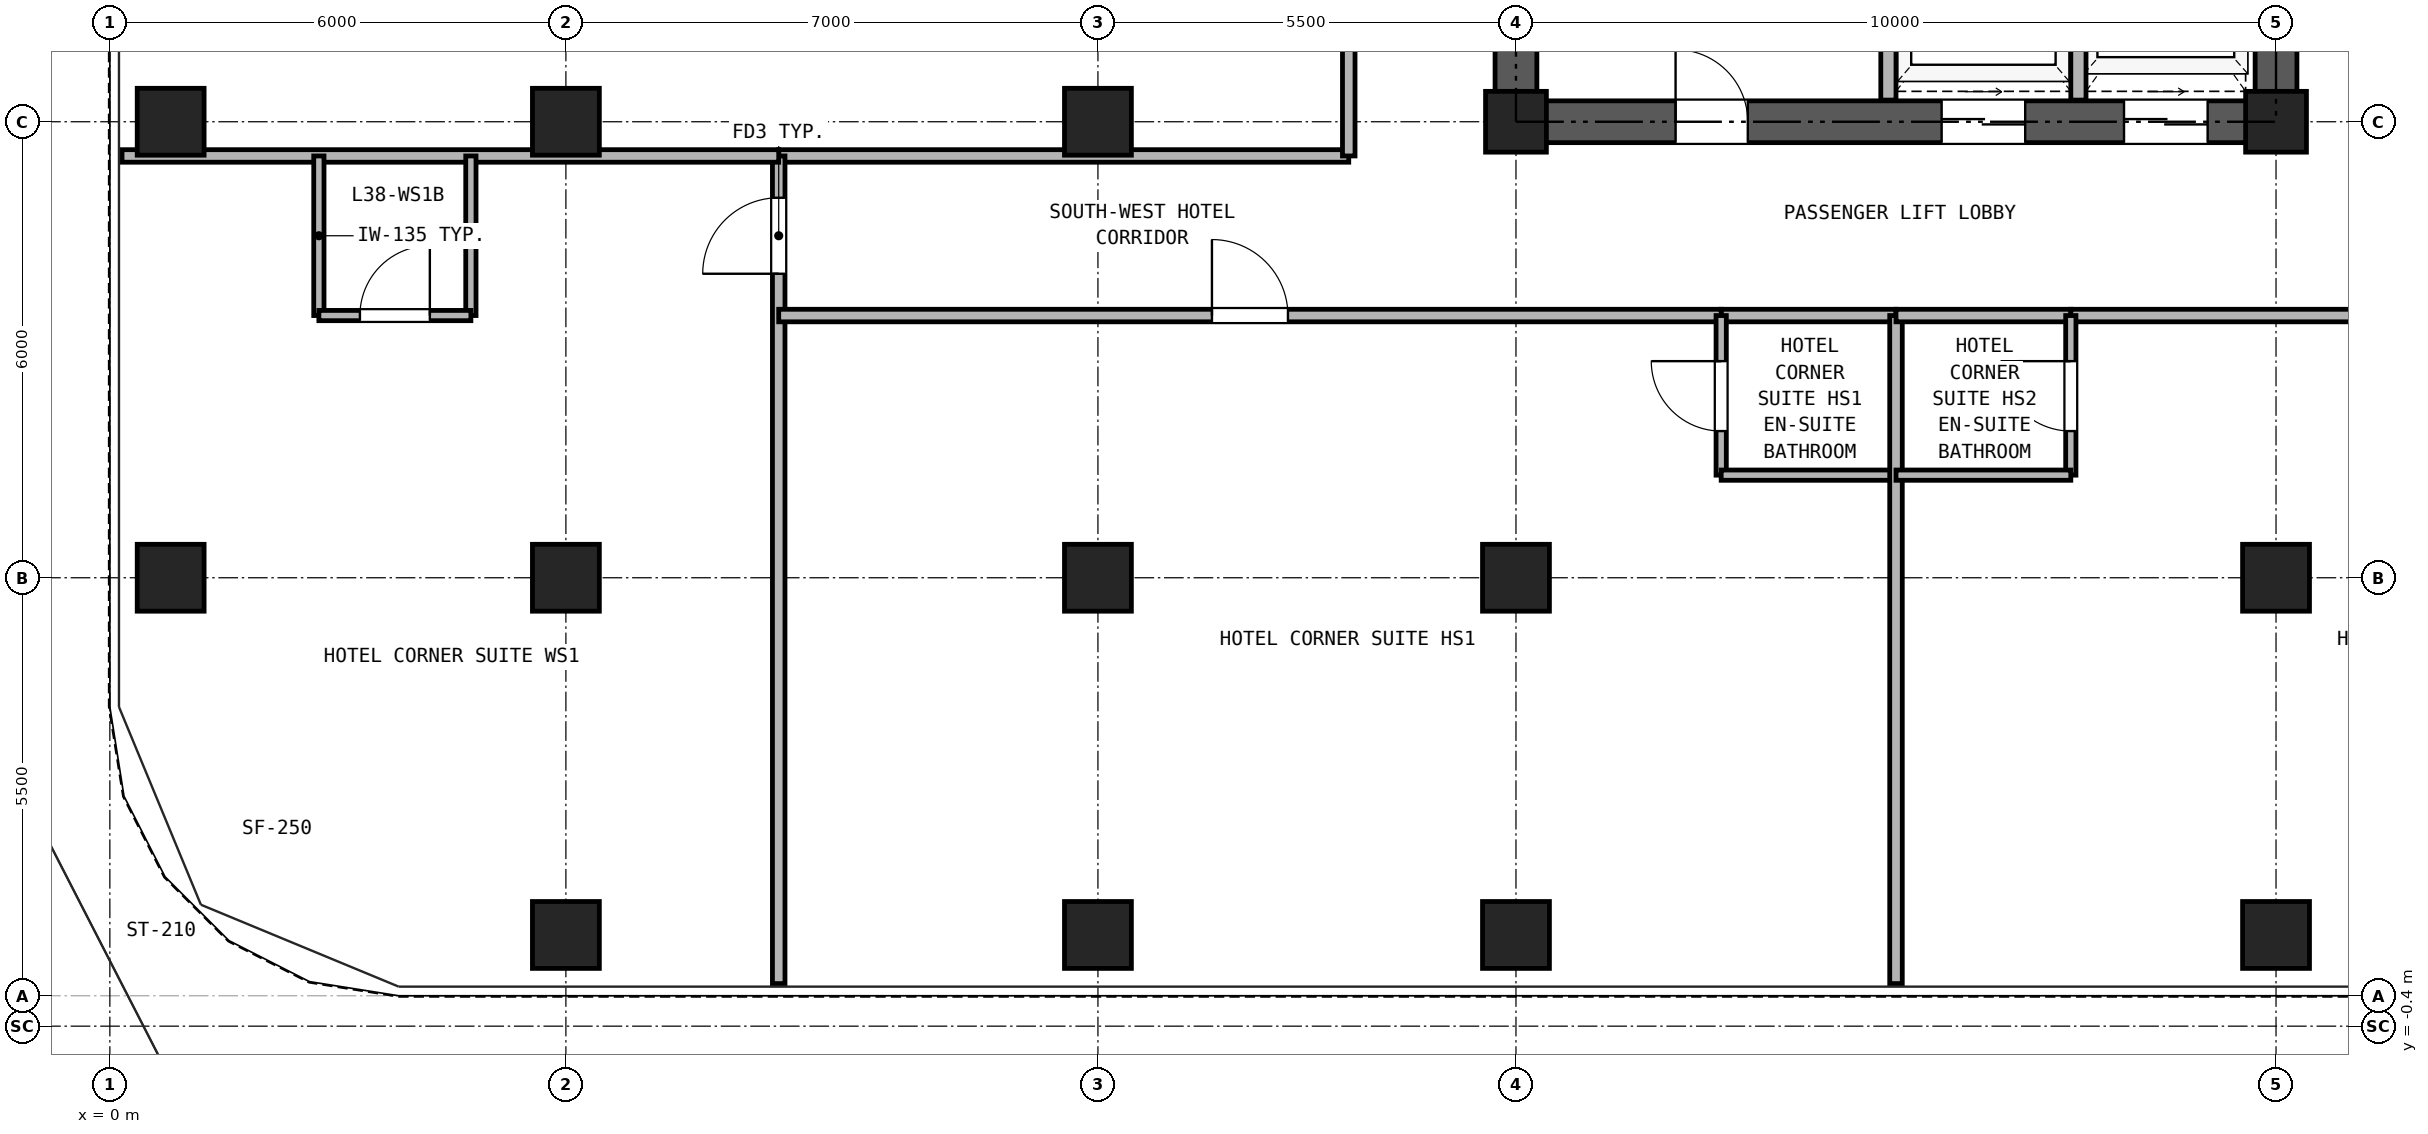
"""IFC4 building model, lengths in metres.
Left out: names, types, materials, properties, quantities, classifications, styles, units other than length and angle.
Written with IfcOpenShell. Run it as: python <this file> out.ifc"""

import sys

from ifc_helpers import new_model, si_unit, direction, frame, frame_2d, origin, origin_2d, place, context, subcontext, project, spatial, rectangle, hollow_rectangle, extrude, source, transform, mapped, element, fill, save


model = new_model("IFC4")
c1 = context("Model", 3, precision=1e-05, world=origin(), true_north=direction((0.0, 1.0)))
c2 = subcontext(c1, "Body", "Model", "MODEL_VIEW")
j1 = project(units=[si_unit("LENGTHUNIT", "METRE"), si_unit("PLANEANGLEUNIT", "RADIAN")], contexts=[c1])
p1 = place(None, origin())
s1 = spatial("IfcSite", under=j1, at=p1, CompositionType="ELEMENT")
p2 = place(p1, origin())
s2 = spatial("IfcBuilding", under=s1, at=p2, CompositionType="ELEMENT")
p3 = place(p2, frame((0.0, 0.0, 137.5)))
s3 = spatial("IfcBuildingStorey", under=s2, at=p3, CompositionType="ELEMENT", Elevation=137.5)
m1 = source(origin(), c2, "Body", "SweptSolid", [
    extrude(hollow_rectangle(XDim=0.88, YDim=0.88, WallThickness=0.05, at=origin_2d()), origin(), (0.0, 0.0, 1.0), 2.95),
])
for number, where, z_axis, x_axis in (
    (1, (6.0, 0.8, 0.0), (0.0, 0.0, 1.0), (1.0, 0.0, 0.0)),
    (2, (13.0, 0.8, 0.0), (0.0, 0.0, 1.0), (1.0, 0.0, 0.0)),
    (3, (18.5, 0.8, 0.0), (0.0, 0.0, 1.0), (1.0, 0.0, 0.0)),
    (4, (28.5, 0.8, 0.0), (0.0, 0.0, 1.0), (1.0, 0.0, 0.0)),
    (5, (0.8, 5.5, 0.0), (0.0, 0.0, 1.0), (1.0, 0.0, 0.0)),
    (6, (0.8, 11.5, 0.0), (0.0, 0.0, 1.0), (1.0, 0.0, 0.0)),
    (7, (6.0, 5.5, 0.0), (0.0, 0.0, 1.0), (1.0, 0.0, 0.0)),
    (8, (6.0, 11.5, 0.0), (0.0, 0.0, 1.0), (1.0, 0.0, 0.0)),
    (9, (13.0, 5.5, 0.0), (0.0, 0.0, 1.0), (1.0, 0.0, 0.0)),
    (10, (13.0, 11.5, 0.0), (0.0, 0.0, 1.0), (1.0, 0.0, 0.0)),
    (11, (18.5, 5.5, 0.0), (0.0, 0.0, 1.0), (1.0, 0.0, 0.0)),
):
    element("IfcColumn", number, at=place(p3, frame(where, z_axis=z_axis, x_axis=x_axis)), inside=s3, PredefinedType="COLUMN", context=c2, shape_type="MappedRepresentation", body=[
        mapped(m1, transform((0.0, 0.0, 0.0), x_axis=(1.0, 0.0, 0.0), y_axis=(0.0, 1.0, 0.0), z_axis=(0.0, 0.0, 1.0), scale=1.0)),
    ])
m2 = source(origin(), c2, "Body", "SweptSolid", [
    extrude(hollow_rectangle(XDim=0.8, YDim=0.8, WallThickness=0.045, at=origin_2d()), origin(), (0.0, 0.0, 1.0), 2.95),
])
p4 = place(p3, frame((18.5, 11.5, 0.0), z_axis=(0.0, 0.0, 1.0), x_axis=(1.0, 0.0, 0.0)))
e12 = element("IfcColumn", 12, at=p4, inside=s3, PredefinedType="COLUMN", context=c2, shape_type="MappedRepresentation", body=[
    mapped(m2, transform((0.0, 0.0, 0.0), x_axis=(1.0, 0.0, 0.0), y_axis=(0.0, 1.0, 0.0), z_axis=(0.0, 0.0, 1.0), scale=1.0)),
])
p5 = place(p3, frame((28.5, 5.5, 0.0), z_axis=(0.0, 0.0, 1.0), x_axis=(1.0, 0.0, 0.0)))
e13 = element("IfcColumn", 13, at=p5, inside=s3, PredefinedType="COLUMN", context=c2, shape_type="MappedRepresentation", body=[
    mapped(m1, transform((0.0, 0.0, 0.0), x_axis=(1.0, 0.0, 0.0), y_axis=(0.0, 1.0, 0.0), z_axis=(0.0, 0.0, 1.0), scale=1.0)),
])
p6 = place(p3, frame((28.5, 11.5, 0.0), z_axis=(0.0, 0.0, 1.0), x_axis=(1.0, 0.0, 0.0)))
e14 = element("IfcColumn", 14, at=p6, inside=s3, PredefinedType="COLUMN", context=c2, shape_type="MappedRepresentation", body=[
    mapped(m2, transform((0.0, 0.0, 0.0), x_axis=(1.0, 0.0, 0.0), y_axis=(0.0, 1.0, 0.0), z_axis=(0.0, 0.0, 1.0), scale=1.0)),
])
p7 = place(p3, frame((18.225, 11.5, 0.0), z_axis=(0.0, 0.0, 1.0), x_axis=(1.0, 0.0, 0.0)))
e15 = element("IfcWall", 15, at=p7, inside=s3, PredefinedType="SHEAR", context=c2, shape_type="SweptSolid", body=[
    extrude(rectangle(XDim=10.55, YDim=0.55, at=frame_2d((5.275, 0.0))), origin(), (0.0, 0.0, 1.0), 2.95),
])
p8 = place(p7, frame((2.375, 0.0, 0.0)))
e16 = element("IfcOpeningElement", 16, at=p8, cuts=e15, PredefinedType="OPENING", context=c2, shape_type="SweptSolid", body=[
    extrude(rectangle(XDim=0.95, YDim=2.15, at=frame_2d((0.475, 1.075))), frame((0.0, 0.285, 0.0), z_axis=(0.0, -1.0, 0.0), x_axis=(1.0, 0.0, 0.0)), (0.0, 0.0, 1.0), 0.57),
])
p9 = place(p7, frame((5.875, 0.0, 0.0)))
e17 = element("IfcOpeningElement", 17, at=p9, cuts=e15, PredefinedType="OPENING", context=c2, shape_type="SweptSolid", body=[
    extrude(rectangle(XDim=1.1, YDim=2.25, at=frame_2d((0.55, 1.125))), frame((0.0, 0.285, 0.0), z_axis=(0.0, -1.0, 0.0), x_axis=(1.0, 0.0, 0.0)), (0.0, 0.0, 1.0), 0.57),
])
p10 = place(p7, frame((8.275, 0.0, 0.0)))
e18 = element("IfcOpeningElement", 18, at=p10, cuts=e15, PredefinedType="OPENING", context=c2, shape_type="SweptSolid", body=[
    extrude(rectangle(XDim=1.1, YDim=2.25, at=frame_2d((0.55, 1.125))), frame((0.0, 0.285, 0.0), z_axis=(0.0, -1.0, 0.0), x_axis=(1.0, 0.0, 0.0)), (0.0, 0.0, 1.0), 0.57),
])
p11 = place(p3, frame((18.5, 11.775, 0.0), z_axis=(0.0, 0.0, 1.0), x_axis=(0.0, 1.0, 0.0)))
e19 = element("IfcWall", 19, at=p11, inside=s3, PredefinedType="SHEAR", context=c2, shape_type="SweptSolid", body=[
    extrude(rectangle(XDim=16.7, YDim=0.55, at=frame_2d((8.35, 0.0))), origin(), (0.0, 0.0, 1.0), 2.95),
])
p12 = place(p11, frame((7.375, 0.0, 0.0)))
e20 = element("IfcOpeningElement", 20, at=p12, cuts=e19, PredefinedType="OPENING", context=c2, shape_type="SweptSolid", body=[
    extrude(rectangle(XDim=1.15, YDim=2.2, at=frame_2d((0.575, 1.1))), frame((0.0, 0.285, 0.0), z_axis=(0.0, -1.0, 0.0), x_axis=(1.0, 0.0, 0.0)), (0.0, 0.0, 1.0), 0.57),
])
p13 = place(p3, frame((28.5, 11.775, 0.0), z_axis=(0.0, 0.0, 1.0), x_axis=(0.0, 1.0, 0.0)))
e21 = element("IfcWall", 21, at=p13, inside=s3, PredefinedType="SHEAR", context=c2, shape_type="SweptSolid", body=[
    extrude(rectangle(XDim=16.7, YDim=0.55, at=frame_2d((8.35, 0.0))), origin(), (0.0, 0.0, 1.0), 2.95),
])
p14 = place(p13, frame((7.375, 0.0, 0.0)))
e22 = element("IfcOpeningElement", 22, at=p14, cuts=e21, PredefinedType="OPENING", context=c2, shape_type="SweptSolid", body=[
    extrude(rectangle(XDim=1.15, YDim=2.2, at=frame_2d((0.575, 1.1))), frame((0.0, 0.285, 0.0), z_axis=(0.0, -1.0, 0.0), x_axis=(1.0, 0.0, 0.0)), (0.0, 0.0, 1.0), 0.57),
])
for number, where, z_axis, x_axis in (
    (23, (23.4, 11.785, 0.0), (0.0, 0.0, 1.0), (0.0, 1.0, 0.0)),
    (24, (25.9, 11.785, 0.0), (0.0, 0.0, 1.0), (0.0, 1.0, 0.0)),
):
    element("IfcWall", number, at=place(p3, frame(where, z_axis=z_axis, x_axis=x_axis)), inside=s3, PredefinedType="PARTITIONING", context=c2, shape_type="SweptSolid", body=[
        extrude(rectangle(XDim=3.215, YDim=0.2, at=frame_2d((1.607, 0.0))), origin(), (0.0, 0.0, 1.0), 2.95),
    ])
p15 = place(p3, frame((8.8, 11.05, 0.0), z_axis=(0.0, 0.0, 1.0), x_axis=(1.0, 0.0, 0.0)))
e25 = element("IfcWall", 25, at=p15, inside=s3, PredefinedType="PARTITIONING", context=c2, shape_type="SweptSolid", body=[
    extrude(rectangle(XDim=7.5, YDim=0.165, at=frame_2d((3.75, 0.0))), origin(), (0.0, 0.0, 1.0), 2.95),
])
p16 = place(p3, frame((16.3, 11.05, 0.0), z_axis=(0.0, 0.0, 1.0), x_axis=(0.0, 1.0, 0.0)))
e26 = element("IfcWall", 26, at=p16, inside=s3, PredefinedType="PARTITIONING", context=c2, shape_type="SweptSolid", body=[
    extrude(rectangle(XDim=18.2, YDim=0.165, at=frame_2d((9.1, 0.0))), origin(), (0.0, 0.0, 1.0), 2.95),
])
p17 = place(p16, frame((8.6, 0.0, 0.0)))
e27 = element("IfcOpeningElement", 27, at=p17, cuts=e26, PredefinedType="OPENING", context=c2, shape_type="SweptSolid", body=[
    extrude(rectangle(XDim=0.95, YDim=2.15, at=frame_2d((0.475, 1.075))), frame((0.0, 0.093, 0.0), z_axis=(0.0, -1.0, 0.0), x_axis=(1.0, 0.0, 0.0)), (0.0, 0.0, 1.0), 0.185),
])
p18 = place(p3, frame((8.8, 0.16, 0.0), z_axis=(0.0, 0.0, 1.0), x_axis=(0.0, 1.0, 0.0)))
e28 = element("IfcWall", 28, at=p18, inside=s3, PredefinedType="PARTITIONING", context=c2, shape_type="SweptSolid", body=[
    extrude(rectangle(XDim=10.89, YDim=0.165, at=frame_2d((5.445, 0.0))), origin(), (0.0, 0.0, 1.0), 2.95),
])
p19 = place(p18, frame((9.34, 0.0, 0.0)))
e29 = element("IfcOpeningElement", 29, at=p19, cuts=e28, PredefinedType="OPENING", context=c2, shape_type="SweptSolid", body=[
    extrude(rectangle(XDim=1.0, YDim=2.15, at=frame_2d((0.5, 1.075))), frame((0.0, 0.093, 0.0), z_axis=(0.0, -1.0, 0.0), x_axis=(1.0, 0.0, 0.0)), (0.0, 0.0, 1.0), 0.185),
])
p20 = place(p3, frame((0.16, 11.05, 0.0), z_axis=(0.0, 0.0, 1.0), x_axis=(1.0, 0.0, 0.0)))
e30 = element("IfcWall", 30, at=p20, inside=s3, PredefinedType="PARTITIONING", context=c2, shape_type="SweptSolid", body=[
    extrude(rectangle(XDim=8.64, YDim=0.165, at=frame_2d((4.32, 0.0))), origin(), (0.0, 0.0, 1.0), 2.95),
])
for number, where, z_axis, x_axis in (
    (31, (2.75, 8.95, 0.0), (0.0, 0.0, 1.0), (0.0, 1.0, 0.0)),
    (32, (4.75, 8.95, 0.0), (0.0, 0.0, 1.0), (0.0, 1.0, 0.0)),
):
    element("IfcWall", number, at=place(p3, frame(where, z_axis=z_axis, x_axis=x_axis)), inside=s3, PredefinedType="PARTITIONING", context=c2, shape_type="SweptSolid", body=[
        extrude(rectangle(XDim=2.1, YDim=0.135, at=frame_2d((1.05, 0.0))), origin(), (0.0, 0.0, 1.0), 2.95),
    ])
p21 = place(p3, frame((2.75, 8.95, 0.0), z_axis=(0.0, 0.0, 1.0), x_axis=(1.0, 0.0, 0.0)))
e33 = element("IfcWall", 33, at=p21, inside=s3, PredefinedType="PARTITIONING", context=c2, shape_type="SweptSolid", body=[
    extrude(rectangle(XDim=2.0, YDim=0.135, at=frame_2d((1.0, 0.0))), origin(), (0.0, 0.0, 1.0), 2.95),
])
p22 = place(p21, frame((0.54, 0.0, 0.0)))
e34 = element("IfcOpeningElement", 34, at=p22, cuts=e33, PredefinedType="OPENING", context=c2, shape_type="SweptSolid", body=[
    extrude(rectangle(XDim=0.92, YDim=2.1, at=frame_2d((0.46, 1.05))), frame((0.0, 0.077, 0.0), z_axis=(0.0, -1.0, 0.0), x_axis=(1.0, 0.0, 0.0)), (0.0, 0.0, 1.0), 0.155),
])
p23 = place(p3, frame((21.2, 8.95, 0.0), z_axis=(0.0, 0.0, 1.0), x_axis=(1.0, 0.0, 0.0)))
e35 = element("IfcWall", 35, at=p23, inside=s3, PredefinedType="PARTITIONING", context=c2, shape_type="SweptSolid", body=[
    extrude(rectangle(XDim=2.3, YDim=0.165, at=frame_2d((1.15, 0.0))), origin(), (0.0, 0.0, 1.0), 2.95),
])
p24 = place(p3, frame((8.8, 8.95, 0.0), z_axis=(0.0, 0.0, 1.0), x_axis=(1.0, 0.0, 0.0)))
e36 = element("IfcWall", 36, at=p24, inside=s3, PredefinedType="PARTITIONING", context=c2, shape_type="SweptSolid", body=[
    extrude(rectangle(XDim=12.4, YDim=0.165, at=frame_2d((6.2, 0.0))), origin(), (0.0, 0.0, 1.0), 2.95),
])
p25 = place(p24, frame((5.7, 0.0, 0.0)))
e37 = element("IfcOpeningElement", 37, at=p25, cuts=e36, PredefinedType="OPENING", context=c2, shape_type="SweptSolid", body=[
    extrude(rectangle(XDim=1.0, YDim=2.15, at=frame_2d((0.5, 1.075))), frame((0.0, 0.093, 0.0), z_axis=(0.0, -1.0, 0.0), x_axis=(1.0, 0.0, 0.0)), (0.0, 0.0, 1.0), 0.185),
])
p26 = place(p3, frame((21.2, 6.85, 0.0), z_axis=(0.0, 0.0, 1.0), x_axis=(0.0, 1.0, 0.0)))
e38 = element("IfcWall", 38, at=p26, inside=s3, PredefinedType="PARTITIONING", context=c2, shape_type="SweptSolid", body=[
    extrude(rectangle(XDim=2.1, YDim=0.135, at=frame_2d((1.05, 0.0))), origin(), (0.0, 0.0, 1.0), 2.95),
])
p27 = place(p26, frame((0.58, 0.0, 0.0)))
e39 = element("IfcOpeningElement", 39, at=p27, cuts=e38, PredefinedType="OPENING", context=c2, shape_type="SweptSolid", body=[
    extrude(rectangle(XDim=0.92, YDim=2.1, at=frame_2d((0.46, 1.05))), frame((0.0, 0.077, 0.0), z_axis=(0.0, -1.0, 0.0), x_axis=(1.0, 0.0, 0.0)), (0.0, 0.0, 1.0), 0.155),
])
p28 = place(p3, frame((21.2, 6.85, 0.0), z_axis=(0.0, 0.0, 1.0), x_axis=(1.0, 0.0, 0.0)))
e40 = element("IfcWall", 40, at=p28, inside=s3, PredefinedType="PARTITIONING", context=c2, shape_type="SweptSolid", body=[
    extrude(rectangle(XDim=2.3, YDim=0.135, at=frame_2d((1.15, 0.0))), origin(), (0.0, 0.0, 1.0), 2.95),
])
p29 = place(p3, frame((23.5, 0.16, 0.0), z_axis=(0.0, 0.0, 1.0), x_axis=(0.0, 1.0, 0.0)))
e41 = element("IfcWall", 41, at=p29, inside=s3, PredefinedType="PARTITIONING", context=c2, shape_type="SweptSolid", body=[
    extrude(rectangle(XDim=8.79, YDim=0.165, at=frame_2d((4.395, 0.0))), origin(), (0.0, 0.0, 1.0), 2.95),
])
p30 = place(p3, frame((23.5, 8.95, 0.0), z_axis=(0.0, 0.0, 1.0), x_axis=(1.0, 0.0, 0.0)))
e42 = element("IfcWall", 42, at=p30, inside=s3, PredefinedType="PARTITIONING", context=c2, shape_type="SweptSolid", body=[
    extrude(rectangle(XDim=2.3, YDim=0.165, at=frame_2d((1.15, 0.0))), origin(), (0.0, 0.0, 1.0), 2.95),
])
p31 = place(p3, frame((25.8, 8.95, 0.0), z_axis=(0.0, 0.0, 1.0), x_axis=(1.0, 0.0, 0.0)))
e43 = element("IfcWall", 43, at=p31, inside=s3, PredefinedType="PARTITIONING", context=c2, shape_type="SweptSolid", body=[
    extrude(rectangle(XDim=12.4, YDim=0.165, at=frame_2d((6.2, 0.0))), origin(), (0.0, 0.0, 1.0), 2.95),
])
p32 = place(p31, frame((5.7, 0.0, 0.0)))
e44 = element("IfcOpeningElement", 44, at=p32, cuts=e43, PredefinedType="OPENING", context=c2, shape_type="SweptSolid", body=[
    extrude(rectangle(XDim=1.0, YDim=2.15, at=frame_2d((0.5, 1.075))), frame((0.0, 0.093, 0.0), z_axis=(0.0, -1.0, 0.0), x_axis=(1.0, 0.0, 0.0)), (0.0, 0.0, 1.0), 0.185),
])
p33 = place(p3, frame((25.8, 6.85, 0.0), z_axis=(0.0, 0.0, 1.0), x_axis=(0.0, 1.0, 0.0)))
e45 = element("IfcWall", 45, at=p33, inside=s3, PredefinedType="PARTITIONING", context=c2, shape_type="SweptSolid", body=[
    extrude(rectangle(XDim=2.1, YDim=0.135, at=frame_2d((1.05, 0.0))), origin(), (0.0, 0.0, 1.0), 2.95),
])
p34 = place(p33, frame((0.58, 0.0, 0.0)))
e46 = element("IfcOpeningElement", 46, at=p34, cuts=e45, PredefinedType="OPENING", context=c2, shape_type="SweptSolid", body=[
    extrude(rectangle(XDim=0.92, YDim=2.1, at=frame_2d((0.46, 1.05))), frame((0.0, 0.077, 0.0), z_axis=(0.0, -1.0, 0.0), x_axis=(1.0, 0.0, 0.0)), (0.0, 0.0, 1.0), 0.155),
])
p35 = place(p3, frame((23.5, 6.85, 0.0), z_axis=(0.0, 0.0, 1.0), x_axis=(1.0, 0.0, 0.0)))
e47 = element("IfcWall", 47, at=p35, inside=s3, PredefinedType="PARTITIONING", context=c2, shape_type="SweptSolid", body=[
    extrude(rectangle(XDim=2.3, YDim=0.135, at=frame_2d((1.15, 0.0))), origin(), (0.0, 0.0, 1.0), 2.95),
])
p36 = place(p8, frame((0.95, 0.0, 0.0), z_axis=(0.0, 0.0, 1.0), x_axis=(-1.0, 0.0, 0.0)))
e48 = element("IfcDoor", 48, at=p36, inside=s3, OperationType="SINGLE_SWING_LEFT", PredefinedType="DOOR", context=c2, shape_type="SweptSolid", body=[
    extrude(rectangle(XDim=0.95, YDim=2.15, at=frame_2d((0.475, 1.075))), frame((0.0, 0.025, 0.0), z_axis=(0.0, -1.0, 0.0), x_axis=(1.0, 0.0, 0.0)), (0.0, 0.0, 1.0), 0.05),
])
fill(e16, e48)
p37 = place(p9, frame((1.1, 0.0, 0.0), z_axis=(0.0, 0.0, 1.0), x_axis=(-1.0, 0.0, 0.0)))
e49 = element("IfcDoor", 49, at=p37, inside=s3, OperationType="DOUBLE_DOOR_SLIDING", PredefinedType="DOOR", context=c2, shape_type="SweptSolid", body=[
    extrude(rectangle(XDim=1.1, YDim=2.25, at=frame_2d((0.55, 1.125))), frame((0.0, 0.025, 0.0), z_axis=(0.0, -1.0, 0.0), x_axis=(1.0, 0.0, 0.0)), (0.0, 0.0, 1.0), 0.05),
])
fill(e17, e49)
p38 = place(p10, frame((1.1, 0.0, 0.0), z_axis=(0.0, 0.0, 1.0), x_axis=(-1.0, 0.0, 0.0)))
e50 = element("IfcDoor", 50, at=p38, inside=s3, OperationType="DOUBLE_DOOR_SLIDING", PredefinedType="DOOR", context=c2, shape_type="SweptSolid", body=[
    extrude(rectangle(XDim=1.1, YDim=2.25, at=frame_2d((0.55, 1.125))), frame((0.0, 0.025, 0.0), z_axis=(0.0, -1.0, 0.0), x_axis=(1.0, 0.0, 0.0)), (0.0, 0.0, 1.0), 0.05),
])
fill(e18, e50)
p39 = place(p22, origin())
e51 = element("IfcDoor", 51, at=p39, inside=s3, OperationType="SINGLE_SWING_RIGHT", PredefinedType="DOOR", context=c2, shape_type="SweptSolid", body=[
    extrude(rectangle(XDim=0.92, YDim=2.1, at=frame_2d((0.46, 1.05))), frame((0.0, 0.025, 0.0), z_axis=(0.0, -1.0, 0.0), x_axis=(1.0, 0.0, 0.0)), (0.0, 0.0, 1.0), 0.05),
])
fill(e34, e51)
p40 = place(p19, origin())
e52 = element("IfcDoor", 52, at=p40, inside=s3, OperationType="SINGLE_SWING_LEFT", PredefinedType="DOOR", context=c2, shape_type="SweptSolid", body=[
    extrude(rectangle(XDim=1.0, YDim=2.15, at=frame_2d((0.5, 1.075))), frame((0.0, 0.025, 0.0), z_axis=(0.0, -1.0, 0.0), x_axis=(1.0, 0.0, 0.0)), (0.0, 0.0, 1.0), 0.05),
])
fill(e29, e52)
p41 = place(p27, origin())
e53 = element("IfcDoor", 53, at=p41, inside=s3, OperationType="SINGLE_SWING_RIGHT", PredefinedType="DOOR", context=c2, shape_type="SweptSolid", body=[
    extrude(rectangle(XDim=0.92, YDim=2.1, at=frame_2d((0.46, 1.05))), frame((0.0, 0.025, 0.0), z_axis=(0.0, -1.0, 0.0), x_axis=(1.0, 0.0, 0.0)), (0.0, 0.0, 1.0), 0.05),
])
fill(e39, e53)
p42 = place(p25, frame((1.0, 0.0, 0.0), z_axis=(0.0, 0.0, 1.0), x_axis=(-1.0, 0.0, 0.0)))
e54 = element("IfcDoor", 54, at=p42, inside=s3, OperationType="SINGLE_SWING_LEFT", PredefinedType="DOOR", context=c2, shape_type="SweptSolid", body=[
    extrude(rectangle(XDim=1.0, YDim=2.15, at=frame_2d((0.5, 1.075))), frame((0.0, 0.025, 0.0), z_axis=(0.0, -1.0, 0.0), x_axis=(1.0, 0.0, 0.0)), (0.0, 0.0, 1.0), 0.05),
])
fill(e37, e54)
p43 = place(p34, frame((0.92, 0.0, 0.0), z_axis=(0.0, 0.0, 1.0), x_axis=(-1.0, 0.0, 0.0)))
e55 = element("IfcDoor", 55, at=p43, inside=s3, OperationType="SINGLE_SWING_RIGHT", PredefinedType="DOOR", context=c2, shape_type="SweptSolid", body=[
    extrude(rectangle(XDim=0.92, YDim=2.1, at=frame_2d((0.46, 1.05))), frame((0.0, 0.025, 0.0), z_axis=(0.0, -1.0, 0.0), x_axis=(1.0, 0.0, 0.0)), (0.0, 0.0, 1.0), 0.05),
])
fill(e46, e55)
save(model, sys.argv[1])
